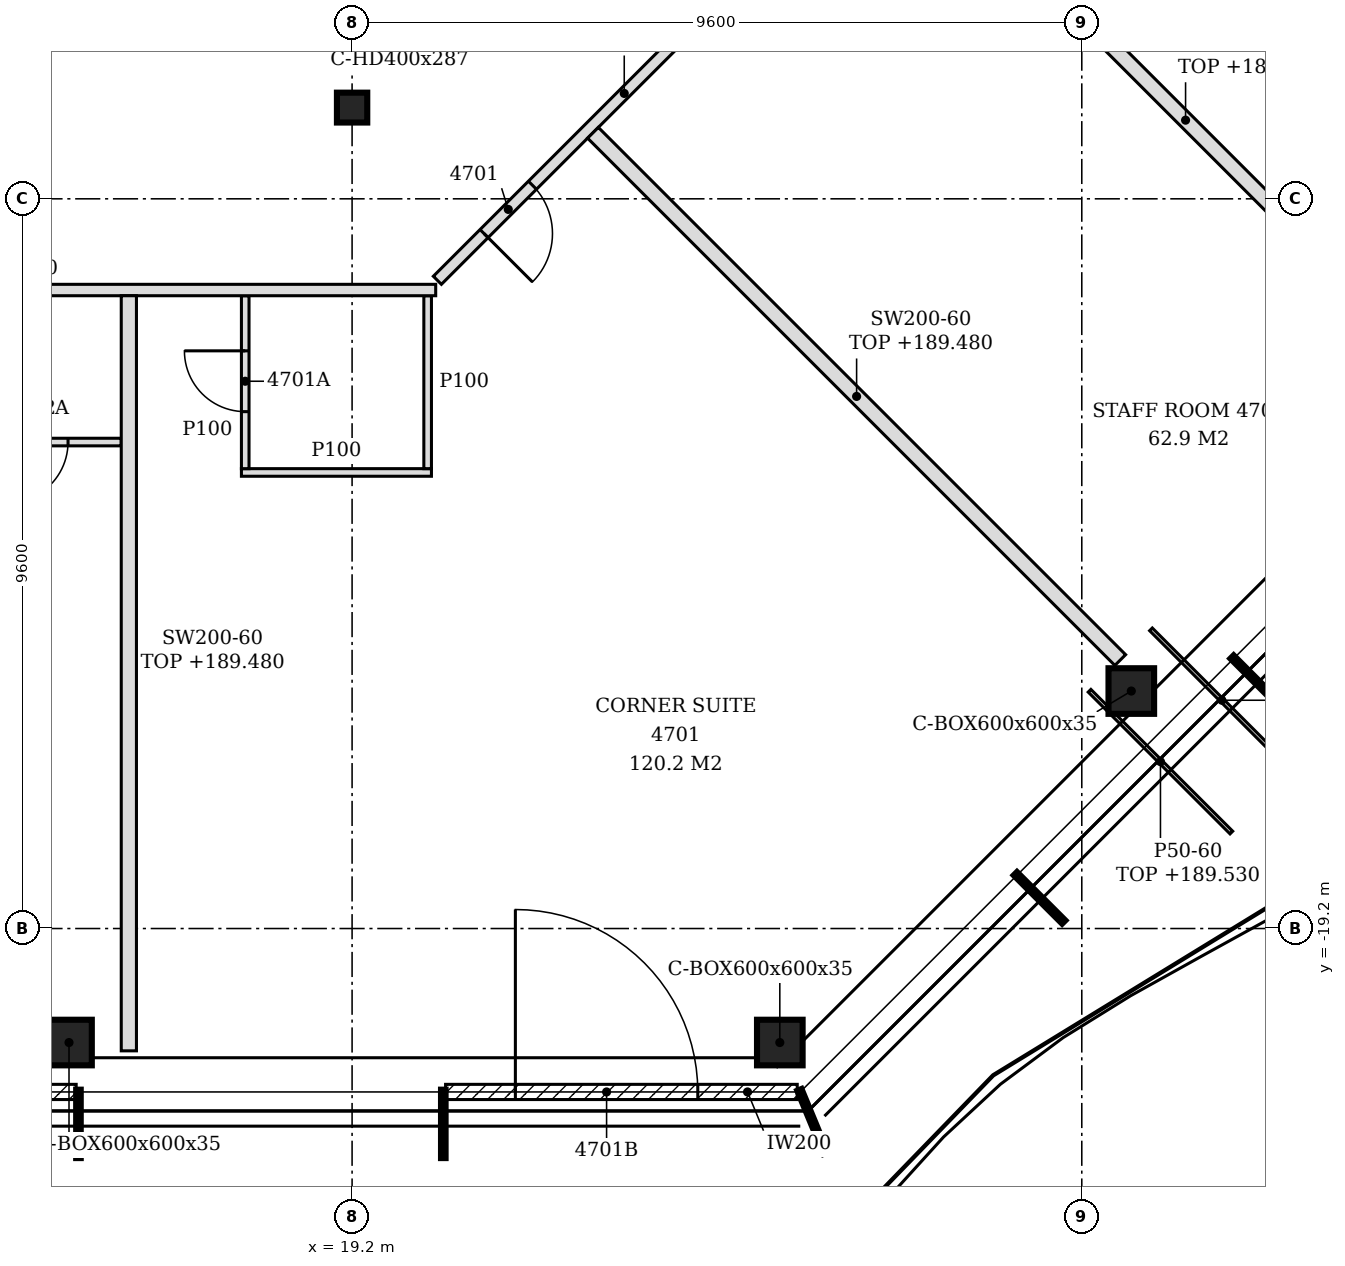
"""IFC4 building model, lengths in metres.
Left out: names, types, materials, properties, quantities, classifications, styles, units other than length and angle.
Written with IfcOpenShell. Run it as: python <this file> out.ifc"""

import sys

from ifc_helpers import new_model, si_unit, direction, frame, frame_2d, origin, origin_2d, place, context, subcontext, project, spatial, polyline, rectangle, hollow_rectangle, i_section, outline, extrude, clip, halfspace, element, fill, save


model = new_model("IFC4")
c1 = context("Model", 3, precision=1e-05, world=origin(), true_north=direction((0.0, 1.0)))
c2 = subcontext(c1, "Body", "Model", "MODEL_VIEW")
j1 = project(units=[si_unit("LENGTHUNIT", "METRE"), si_unit("PLANEANGLEUNIT", "RADIAN")], contexts=[c1])
p1 = place(None, origin())
s1 = spatial("IfcSite", under=j1, at=p1, CompositionType="ELEMENT")
p2 = place(p1, origin())
s2 = spatial("IfcBuilding", under=s1, at=p2, CompositionType="ELEMENT")
p3 = place(p2, frame((0.0, 0.0, 186.6)))
s3 = spatial("IfcBuildingStorey", under=s2, at=p3, CompositionType="ELEMENT", Elevation=186.6)
p4 = place(p3, frame((15.476, -20.7, -0.15), z_axis=(0.38726387287, -0.258155907814, 0.885088820419), x_axis=(0.554670435147, 0.832070134288, 0.0)))
e1 = element("IfcColumn", 1, at=p4, inside=s3, PredefinedType="COLUMN", context=c2, shape_type="Clipping", body=[
    clip(extrude(hollow_rectangle(XDim=0.6, YDim=0.6, WallThickness=0.035, at=origin_2d()), origin(), (0.0, 0.0, 1.0), 4.067), halfspace(frame((0.0, 0.0, 4.049), z_axis=(0.0, 0.0, 1.0), x_axis=(1.0, 0.0, 0.0)), False)),
])
p5 = place(p3, frame((24.827, -20.7, -0.15), z_axis=(0.387212850535, -0.258161908255, 0.885109392961), x_axis=(0.554729959787, 0.832030451194, 0.0)))
e2 = element("IfcColumn", 2, at=p5, inside=s3, PredefinedType="COLUMN", context=c2, shape_type="Clipping", body=[
    clip(extrude(hollow_rectangle(XDim=0.6, YDim=0.6, WallThickness=0.035, at=origin_2d()), origin(), (0.0, 0.0, 1.0), 4.067), halfspace(frame((0.0, 0.0, 4.049), z_axis=(0.0, 0.0, 1.0), x_axis=(1.0, 0.0, 0.0)), False)),
])
p6 = place(p3, frame((29.451, -16.076, -0.15), z_axis=(0.38726387287, -0.258155907814, 0.885088820419), x_axis=(0.554670435147, 0.832070134288, 0.0)))
e3 = element("IfcColumn", 3, at=p6, inside=s3, PredefinedType="COLUMN", context=c2, shape_type="Clipping", body=[
    clip(extrude(hollow_rectangle(XDim=0.6, YDim=0.6, WallThickness=0.035, at=origin_2d()), origin(), (0.0, 0.0, 1.0), 4.067), halfspace(frame((0.0, 0.0, 4.049), z_axis=(0.0, 0.0, 1.0), x_axis=(1.0, 0.0, 0.0)), False)),
])
p7 = place(p3, frame((19.2, -8.4, -0.15), z_axis=(0.0, 0.0, 1.0), x_axis=(1.0, 0.0, 0.0)))
e4 = element("IfcColumn", 4, at=p7, inside=s3, PredefinedType="COLUMN", context=c2, shape_type="SweptSolid", body=[
    extrude(i_section(OverallWidth=0.399, OverallDepth=0.393, WebThickness=0.023, FlangeThickness=0.037, FilletRadius=0.015, at=origin_2d()), origin(), (0.0, 0.0, 1.0), 3.6),
])
p8 = place(p3, frame((10.83, -21.35, 0.0), z_axis=(0.0, 0.0, 1.0), x_axis=(1.0, 0.0, 0.0)))
e5 = element("IfcWall", 5, at=p8, inside=s3, PredefinedType="NOTDEFINED", context=c2, shape_type="SweptSolid", body=[
    extrude(rectangle(XDim=4.74, YDim=0.2, at=frame_2d((2.37, 0.0))), origin(), (0.0, 0.0, 1.0), 3.45),
])
p9 = place(p8, frame((1.17, 0.0, 0.0)))
e6 = element("IfcOpeningElement", 6, at=p9, cuts=e5, PredefinedType="OPENING", context=c2, shape_type="SweptSolid", body=[
    extrude(rectangle(XDim=2.4, YDim=2.4, at=frame_2d((1.2, 1.2))), frame((0.0, 0.11, 0.0), z_axis=(0.0, -1.0, 0.0), x_axis=(1.0, 0.0, 0.0)), (0.0, 0.0, 1.0), 0.22),
])
p10 = place(p3, frame((20.43, -21.35, 0.0), z_axis=(0.0, 0.0, 1.0), x_axis=(1.0, 0.0, 0.0)))
e7 = element("IfcWall", 7, at=p10, inside=s3, PredefinedType="NOTDEFINED", context=c2, shape_type="SweptSolid", body=[
    extrude(rectangle(XDim=4.626, YDim=0.2, at=frame_2d((2.313, 0.0))), origin(), (0.0, 0.0, 1.0), 3.45),
])
p11 = place(p10, frame((0.918, 0.0, 0.0)))
e8 = element("IfcOpeningElement", 8, at=p11, cuts=e7, PredefinedType="OPENING", context=c2, shape_type="SweptSolid", body=[
    extrude(rectangle(XDim=2.4, YDim=2.4, at=frame_2d((1.2, 1.2))), frame((0.0, 0.11, 0.0), z_axis=(0.0, -1.0, 0.0), x_axis=(1.0, 0.0, 0.0)), (0.0, 0.0, 1.0), 0.22),
])
p12 = place(p3, frame((16.263, -20.809, 0.0), z_axis=(0.0, 0.0, 1.0), x_axis=(0.0, 1.0, 0.0)))
e9 = element("IfcWall", 9, at=p12, inside=s3, PredefinedType="PARTITIONING", context=c2, shape_type="SweptSolid", body=[
    extrude(outline(polyline([(0.012, 0.0), (9.934, 0.0), (9.934, 0.862), (9.934, 1.725), (9.934, 2.587), (9.934, 2.88), (0.0, 2.88), (0.0, 2.587), (0.0, 1.725), (0.012, 0.862), (0.012, 0.0)])), frame((0.0, 0.1, 0.0), z_axis=(0.0, -1.0, 0.0), x_axis=(1.0, 0.0, 0.0)), (0.0, 0.0, 1.0), 0.2),
])
p13 = place(p3, frame((29.306, -15.668, 0.0), z_axis=(0.0, 0.0, 1.0), x_axis=(-0.707106781187, 0.707106781187, 0.0)))
e10 = element("IfcWall", 10, at=p13, inside=s3, PredefinedType="PARTITIONING", context=c2, shape_type="SweptSolid", body=[
    extrude(rectangle(XDim=9.81, YDim=0.2, at=frame_2d((4.905, 0.0))), origin(), (0.0, 0.0, 1.0), 2.88),
])
p14 = place(p3, frame((17.744, -13.2, 0.0), z_axis=(0.0, 0.0, 1.0), x_axis=(1.0, 0.0, 0.0)))
e11 = element("IfcWall", 11, at=p14, inside=s3, PredefinedType="PARTITIONING", context=c2, shape_type="SweptSolid", body=[
    extrude(outline(polyline([(0.0, 0.0), (2.5, 0.0), (2.5, 3.45), (1.606, 3.45), (1.604, 2.73), (1.306, 2.73), (1.304, 3.45), (0.0, 3.45), (0.0, 0.0)])), frame((0.0, 0.05, 0.0), z_axis=(0.0, -1.0, 0.0), x_axis=(1.0, 0.0, 0.0)), (0.0, 0.0, 1.0), 0.1),
])
p15 = place(p3, frame((17.794, -13.15, 0.0), z_axis=(0.0, 0.0, 1.0), x_axis=(0.0, 1.0, 0.0)))
e12 = element("IfcWall", 12, at=p15, inside=s3, PredefinedType="PARTITIONING", context=c2, shape_type="SweptSolid", body=[
    extrude(outline(polyline([(0.0, 0.0), (2.275, 0.0), (2.275, 3.45), (0.205, 3.45), (0.203, 2.88), (0.0, 2.88), (0.0, 0.0)])), frame((0.0, 0.05, 0.0), z_axis=(0.0, -1.0, 0.0), x_axis=(1.0, 0.0, 0.0)), (0.0, 0.0, 1.0), 0.1),
])
p16 = place(p15, frame((0.75, 0.0, 0.0)))
e13 = element("IfcOpeningElement", 13, at=p16, cuts=e12, PredefinedType="OPENING", context=c2, shape_type="SweptSolid", body=[
    extrude(rectangle(XDim=0.8, YDim=2.1, at=frame_2d((0.4, 1.05))), frame((0.0, 0.06, 0.0), z_axis=(0.0, -1.0, 0.0), x_axis=(1.0, 0.0, 0.0)), (0.0, 0.0, 1.0), 0.12),
])
p17 = place(p3, frame((20.194, -13.15, 0.0), z_axis=(0.0, 0.0, 1.0), x_axis=(0.0, 1.0, 0.0)))
e14 = element("IfcWall", 14, at=p17, inside=s3, PredefinedType="PARTITIONING", context=c2, shape_type="SweptSolid", body=[
    extrude(outline(polyline([(0.0, 0.0), (2.275, 0.0), (2.275, 3.45), (0.205, 3.45), (0.203, 2.88), (0.0, 2.88), (0.0, 0.0)])), frame((0.0, 0.05, 0.0), z_axis=(0.0, -1.0, 0.0), x_axis=(1.0, 0.0, 0.0)), (0.0, 0.0, 1.0), 0.1),
])
p18 = place(p3, frame((13.813, -12.8, 0.0), z_axis=(0.0, 0.0, 1.0), x_axis=(1.0, 0.0, 0.0)))
e15 = element("IfcWall", 15, at=p18, inside=s3, PredefinedType="PARTITIONING", context=c2, shape_type="SweptSolid", body=[
    extrude(rectangle(XDim=2.35, YDim=0.1, at=frame_2d((1.175, 0.0))), origin(), (0.0, 0.0, 1.0), 3.45),
])
p19 = place(p18, frame((0.85, 0.0, 0.0)))
e16 = element("IfcOpeningElement", 16, at=p19, cuts=e15, PredefinedType="OPENING", context=c2, shape_type="SweptSolid", body=[
    extrude(rectangle(XDim=0.8, YDim=2.1, at=frame_2d((0.4, 1.05))), frame((0.0, 0.06, 0.0), z_axis=(0.0, -1.0, 0.0), x_axis=(1.0, 0.0, 0.0)), (0.0, 0.0, 1.0), 0.12),
])
p20 = place(p3, frame((33.981, -12.381, 0.0), z_axis=(0.0, 0.0, 1.0), x_axis=(-0.707095469378, 0.707118092814, 0.0)))
e17 = element("IfcWall", 17, at=p20, inside=s3, PredefinedType="PARTITIONING", context=c2, shape_type="SweptSolid", body=[
    extrude(rectangle(XDim=10.792, YDim=0.2, at=frame_2d((5.396, 0.0))), origin(), (0.0, 0.0, 1.0), 2.63),
])
p21 = place(p3, frame((-5.9, -10.8, 0.0), z_axis=(0.0, 0.0, 1.0), x_axis=(1.0, 0.0, 0.0)))
e18 = element("IfcWall", 18, at=p21, inside=s3, PredefinedType="PARTITIONING", context=c2, shape_type="SweptSolid", body=[
    extrude(outline(polyline([(0.0, 0.0), (26.2, 0.0), (26.2, 3.45), (25.25, 3.45), (25.248, 2.73), (24.95, 2.73), (24.948, 3.45), (13.25, 3.45), (13.248, 2.73), (12.95, 2.73), (12.948, 3.45), (1.25, 3.45), (1.248, 2.83), (0.95, 2.83), (0.948, 3.45), (0.0, 3.45), (0.0, 0.0)])), frame((0.0, 0.075, 0.0), z_axis=(0.0, -1.0, 0.0), x_axis=(1.0, 0.0, 0.0)), (0.0, 0.0, 1.0), 0.15),
])
p22 = place(p21, frame((1.922, 0.0, 0.0)))
e19 = element("IfcOpeningElement", 19, at=p22, cuts=e18, PredefinedType="OPENING", context=c2, shape_type="SweptSolid", body=[
    extrude(rectangle(XDim=0.9, YDim=2.1, at=frame_2d((0.45, 1.05))), frame((0.0, 0.085, 0.0), z_axis=(0.0, -1.0, 0.0), x_axis=(1.0, 0.0, 0.0)), (0.0, 0.0, 1.0), 0.17),
])
p23 = place(p21, frame((5.863, 0.0, 0.0)))
e20 = element("IfcOpeningElement", 20, at=p23, cuts=e18, PredefinedType="OPENING", context=c2, shape_type="SweptSolid", body=[
    extrude(rectangle(XDim=0.9, YDim=2.1, at=frame_2d((0.45, 1.05))), frame((0.0, 0.085, 0.0), z_axis=(0.0, -1.0, 0.0), x_axis=(1.0, 0.0, 0.0)), (0.0, 0.0, 1.0), 0.17),
])
p24 = place(p21, frame((9.95, 0.0, 0.0)))
e21 = element("IfcOpeningElement", 21, at=p24, cuts=e18, PredefinedType="OPENING", context=c2, shape_type="SweptSolid", body=[
    extrude(rectangle(XDim=0.9, YDim=2.1, at=frame_2d((0.45, 1.05))), frame((0.0, 0.085, 0.0), z_axis=(0.0, -1.0, 0.0), x_axis=(1.0, 0.0, 0.0)), (0.0, 0.0, 1.0), 0.17),
])
p25 = place(p21, frame((14.279, 0.0, 0.0)))
e22 = element("IfcOpeningElement", 22, at=p25, cuts=e18, PredefinedType="OPENING", context=c2, shape_type="SweptSolid", body=[
    extrude(rectangle(XDim=0.9, YDim=2.1, at=frame_2d((0.45, 1.05))), frame((0.0, 0.085, 0.0), z_axis=(0.0, -1.0, 0.0), x_axis=(1.0, 0.0, 0.0)), (0.0, 0.0, 1.0), 0.17),
])
p26 = place(p3, frame((20.322, -10.672, 0.0), z_axis=(0.0, 0.0, 1.0), x_axis=(0.707106781187, 0.707106781187, 0.0)))
e23 = element("IfcWall", 23, at=p26, inside=s3, PredefinedType="PARTITIONING", context=c2, shape_type="SweptSolid", body=[
    extrude(rectangle(XDim=8.45, YDim=0.15, at=frame_2d((4.225, 0.0))), origin(), (0.0, 0.0, 1.0), 2.88),
])
p27 = place(p26, frame((0.869, 0.0, 0.0)))
e24 = element("IfcOpeningElement", 24, at=p27, cuts=e23, PredefinedType="OPENING", context=c2, shape_type="SweptSolid", body=[
    extrude(rectangle(XDim=0.9, YDim=2.1, at=frame_2d((0.45, 1.05))), frame((0.0, 0.085, 0.0), z_axis=(0.0, -1.0, 0.0), x_axis=(1.0, 0.0, 0.0)), (0.0, 0.0, 1.0), 0.17),
])
p28 = place(p26, frame((5.185, 0.0, 0.0)))
e25 = element("IfcOpeningElement", 25, at=p28, cuts=e23, PredefinedType="OPENING", context=c2, shape_type="SweptSolid", body=[
    extrude(rectangle(XDim=0.9, YDim=2.1, at=frame_2d((0.45, 1.05))), frame((0.0, 0.085, 0.0), z_axis=(0.0, -1.0, 0.0), x_axis=(1.0, 0.0, 0.0)), (0.0, 0.0, 1.0), 0.17),
])
p29 = place(p3, frame((30.768, -17.938, 0.0), z_axis=(0.0, 0.0, 1.0), x_axis=(-0.707106781187, 0.707106781187, 0.0)))
e26 = element("IfcWall", 26, at=p29, inside=s3, PredefinedType="PARTITIONING", context=c2, shape_type="SweptSolid", body=[
    extrude(rectangle(XDim=2.638, YDim=0.05, at=frame_2d((1.319, 0.0))), origin(), (0.0, 0.0, 1.0), 2.93),
])
p30 = place(p3, frame((31.576, -17.13, 0.0), z_axis=(0.0, 0.0, 1.0), x_axis=(-0.707060512135, 0.707153047211, 0.0)))
e27 = element("IfcWall", 27, at=p30, inside=s3, PredefinedType="PARTITIONING", context=c2, shape_type="SweptSolid", body=[
    extrude(rectangle(XDim=2.638, YDim=0.05, at=frame_2d((1.319, 0.0))), origin(), (0.0, 0.0, 1.0), 2.63),
])
p31 = place(p11, origin())
e28 = element("IfcDoor", 28, at=p31, inside=s3, OperationType="SINGLE_SWING_LEFT", PredefinedType="DOOR", context=c2, shape_type="SweptSolid", body=[
    extrude(rectangle(XDim=2.4, YDim=2.4, at=frame_2d((1.2, 1.2))), frame((0.0, 0.025, 0.0), z_axis=(0.0, -1.0, 0.0), x_axis=(1.0, 0.0, 0.0)), (0.0, 0.0, 1.0), 0.05),
])
fill(e8, e28)
p32 = place(p27, frame((0.9, 0.0, 0.0), z_axis=(0.0, 0.0, 1.0), x_axis=(-1.0, 0.0, 0.0)))
e29 = element("IfcDoor", 29, at=p32, inside=s3, OperationType="SINGLE_SWING_RIGHT", PredefinedType="DOOR", context=c2, shape_type="SweptSolid", body=[
    extrude(rectangle(XDim=0.9, YDim=2.1, at=frame_2d((0.45, 1.05))), frame((0.0, 0.025, 0.0), z_axis=(0.0, -1.0, 0.0), x_axis=(1.0, 0.0, 0.0)), (0.0, 0.0, 1.0), 0.05),
])
fill(e24, e29)
p33 = place(p16, origin())
e30 = element("IfcDoor", 30, at=p33, inside=s3, OperationType="SINGLE_SWING_RIGHT", PredefinedType="DOOR", context=c2, shape_type="SweptSolid", body=[
    extrude(rectangle(XDim=0.8, YDim=2.1, at=frame_2d((0.4, 1.05))), frame((0.0, 0.025, 0.0), z_axis=(0.0, -1.0, 0.0), x_axis=(1.0, 0.0, 0.0)), (0.0, 0.0, 1.0), 0.05),
])
fill(e13, e30)
p34 = place(p19, frame((0.8, 0.0, 0.0), z_axis=(0.0, 0.0, 1.0), x_axis=(-1.0, 0.0, 0.0)))
e31 = element("IfcDoor", 31, at=p34, inside=s3, OperationType="SINGLE_SWING_RIGHT", PredefinedType="DOOR", context=c2, shape_type="SweptSolid", body=[
    extrude(rectangle(XDim=0.8, YDim=2.1, at=frame_2d((0.4, 1.05))), frame((0.0, 0.025, 0.0), z_axis=(0.0, -1.0, 0.0), x_axis=(1.0, 0.0, 0.0)), (0.0, 0.0, 1.0), 0.05),
])
fill(e16, e31)
save(model, sys.argv[1])
